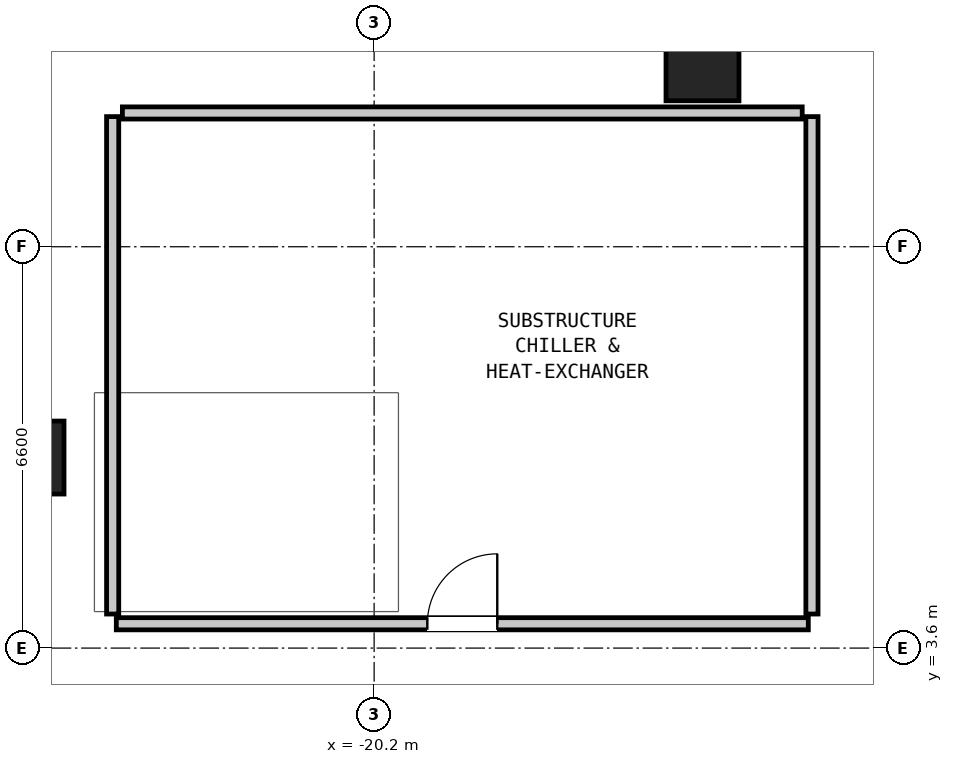
"""IFC4 building model, lengths in metres.
Left out: names, types, materials, properties, quantities, classifications, styles, units other than length and angle.
Written with IfcOpenShell. Run it as: python <this file> out.ifc"""

import sys

from ifc_helpers import new_model, si_unit, direction, frame, frame_2d, origin, origin_2d, place, context, subcontext, project, spatial, rectangle, extrude, element, fill, save


model = new_model("IFC4")
c1 = context("Model", 3, precision=1e-05, world=origin(), true_north=direction((0.0, 1.0)))
c2 = subcontext(c1, "Body", "Model", "MODEL_VIEW")
j1 = project(units=[si_unit("LENGTHUNIT", "METRE"), si_unit("PLANEANGLEUNIT", "RADIAN")], contexts=[c1])
p1 = place(None, origin())
s1 = spatial("IfcSite", under=j1, at=p1, CompositionType="ELEMENT")
p2 = place(p1, origin())
s2 = spatial("IfcBuilding", under=s1, at=p2, CompositionType="ELEMENT")
p3 = place(p2, frame((0.0, 0.0, -9.0)))
s3 = spatial("IfcBuildingStorey", under=s2, at=p3, CompositionType="ELEMENT", Elevation=-9.0)
for number, where, z_axis, x_axis in (
    (1, (-14.8, 13.2, 0.0), (0.0, 0.0, 1.0), (1.0, 0.0, 0.0)),
    (2, (-25.9, 6.733, 0.0), (0.0, 0.0, 1.0), (0.0, 1.0, 0.0)),
):
    element("IfcColumn", number, at=place(p3, frame(where, z_axis=z_axis, x_axis=x_axis)), inside=s3, PredefinedType="COLUMN", context=c2, shape_type="SweptSolid", body=[
        extrude(rectangle(XDim=1.2, YDim=1.2, at=origin_2d()), origin(), (0.0, 0.0, 1.0), 4.5),
    ])
p4 = place(p3, frame((-24.44, 4.0, 0.0), z_axis=(0.0, 0.0, 1.0), x_axis=(1.0, 0.0, 0.0)))
e3 = element("IfcWall", 3, at=p4, inside=s3, PredefinedType="PARTITIONING", context=c2, shape_type="SweptSolid", body=[
    extrude(rectangle(XDim=11.38, YDim=0.2, at=frame_2d((5.69, 0.0))), origin(), (0.0, 0.0, 1.0), 3.042),
])
p5 = place(p4, frame((5.115, 0.0, 0.0)))
e4 = element("IfcOpeningElement", 4, at=p5, cuts=e3, PredefinedType="OPENING", context=c2, shape_type="SweptSolid", body=[
    extrude(rectangle(XDim=1.15, YDim=2.1, at=frame_2d((0.575, 1.05))), frame((0.0, 0.112, 0.0), z_axis=(0.0, -1.0, 0.0), x_axis=(1.0, 0.0, 0.0)), (0.0, 0.0, 1.0), 0.224),
])
for number, where, z_axis, x_axis in (
    (5, (-24.5, 4.16, 0.0), (0.0, 0.0, 1.0), (0.0, 1.0, 0.0)),
    (6, (-13.0, 4.16, 0.0), (0.0, 0.0, 1.0), (0.0, 1.0, 0.0)),
):
    element("IfcWall", number, at=place(p3, frame(where, z_axis=z_axis, x_axis=x_axis)), inside=s3, PredefinedType="PARTITIONING", context=c2, shape_type="SweptSolid", body=[
        extrude(rectangle(XDim=8.18, YDim=0.2, at=frame_2d((4.09, 0.0))), origin(), (0.0, 0.0, 1.0), 4.18),
    ])
p6 = place(p3, frame((-24.34, 12.4, 0.0), z_axis=(0.0, 0.0, 1.0), x_axis=(1.0, 0.0, 0.0)))
e7 = element("IfcWall", 7, at=p6, inside=s3, PredefinedType="PARTITIONING", context=c2, shape_type="SweptSolid", body=[
    extrude(rectangle(XDim=11.18, YDim=0.2, at=frame_2d((5.59, 0.0))), origin(), (0.0, 0.0, 1.0), 4.18),
])
p7 = place(p5, origin())
e8 = element("IfcDoor", 8, at=p7, inside=s3, OperationType="SINGLE_SWING_RIGHT", PredefinedType="DOOR", context=c2, shape_type="SweptSolid", body=[
    extrude(rectangle(XDim=1.15, YDim=2.1, at=frame_2d((0.575, 1.05))), frame((0.0, 0.025, 0.0), z_axis=(0.0, -1.0, 0.0), x_axis=(1.0, 0.0, 0.0)), (0.0, 0.0, 1.0), 0.05),
])
fill(e4, e8)
save(model, sys.argv[1])
